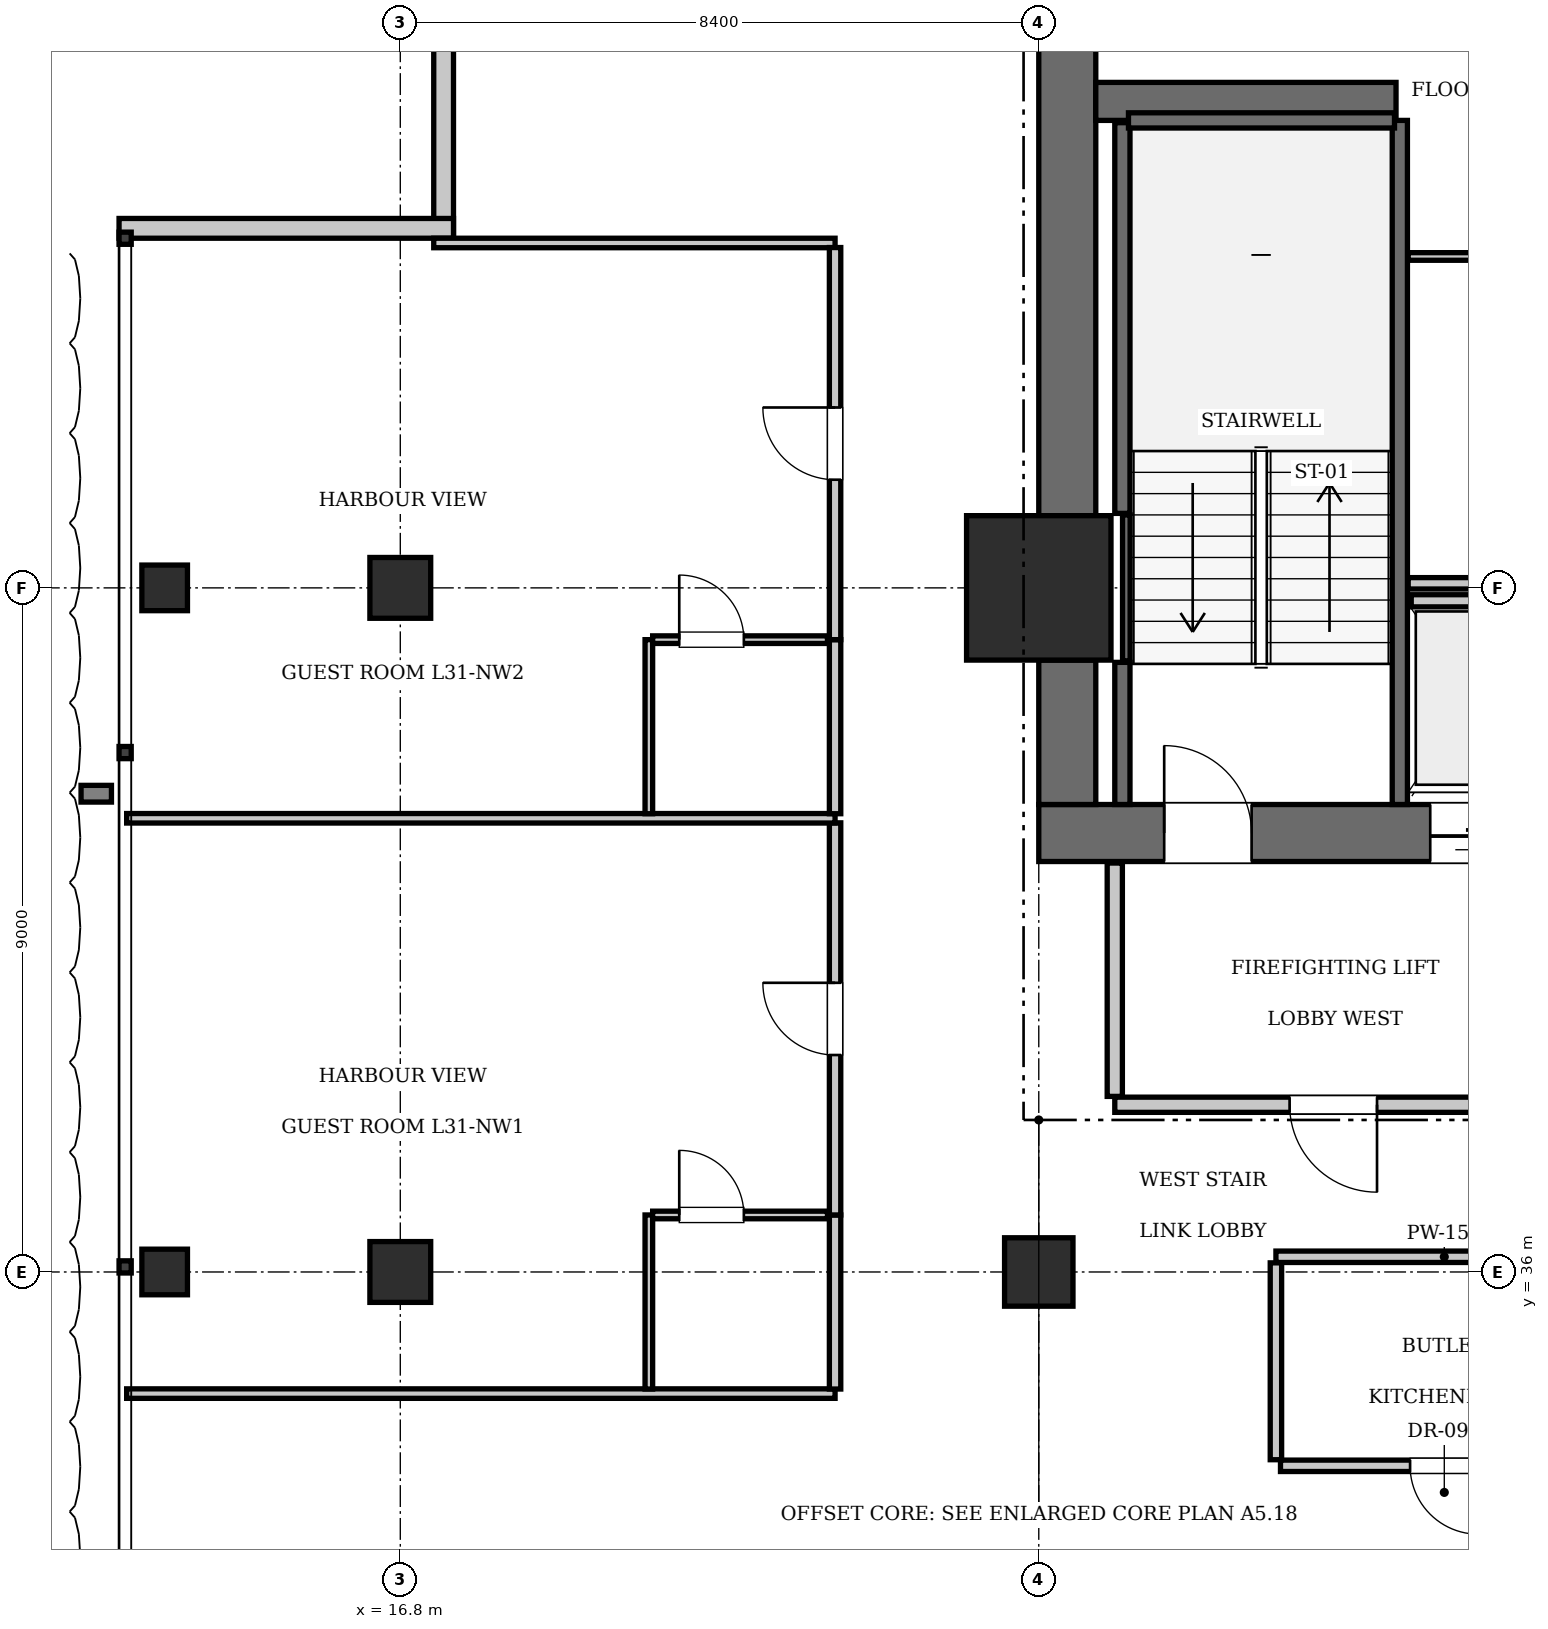
"""IFC4 building model, lengths in metres.
Left out: names, types, materials, properties, quantities, classifications, styles, units other than length and angle.
Written with IfcOpenShell. Run it as: python <this file> out.ifc"""

import sys

from ifc_helpers import new_model, si_unit, direction, frame, frame_2d, origin, origin_2d, place, context, subcontext, project, spatial, rectangle, i_section, extrude, element, fill, save


model = new_model("IFC4")
c1 = context("Model", 3, precision=1e-05, world=origin(), true_north=direction((0.0, 1.0)))
c2 = subcontext(c1, "Body", "Model", "MODEL_VIEW")
j1 = project(units=[si_unit("LENGTHUNIT", "METRE"), si_unit("PLANEANGLEUNIT", "RADIAN")], contexts=[c1])
p1 = place(None, origin())
s1 = spatial("IfcSite", under=j1, at=p1, CompositionType="ELEMENT")
p2 = place(p1, origin())
s2 = spatial("IfcBuilding", under=s1, at=p2, CompositionType="ELEMENT")
p3 = place(p2, frame((0.0, 0.0, 131.25)))
s3 = spatial("IfcBuildingStorey", under=s2, at=p3, CompositionType="ELEMENT", Elevation=131.25)
p4 = place(p3, frame((25.2, 45.0, 0.0), z_axis=(0.0, 0.0, 1.0), x_axis=(1.0, 0.0, 0.0)))
e1 = element("IfcColumn", 1, at=p4, inside=s3, PredefinedType="COLUMN", context=c2, shape_type="SweptSolid", body=[
    extrude(rectangle(XDim=1.9, YDim=1.9, at=origin_2d()), origin(), (0.0, 0.0, 1.0), 3.85),
])
p5 = place(p3, frame((25.2, 41.775, 0.0), z_axis=(0.0, 0.0, 1.0), x_axis=(1.0, 0.0, 0.0)))
e2 = element("IfcWall", 2, at=p5, inside=s3, PredefinedType="SHEAR", context=c2, shape_type="SweptSolid", body=[
    extrude(rectangle(XDim=6.8, YDim=0.75, at=frame_2d((3.4, 0.0))), origin(), (0.0, 0.0, 1.0), 3.85),
])
p6 = place(p5, frame((1.65, 0.0, 0.0)))
e3 = element("IfcOpeningElement", 3, at=p6, cuts=e2, PredefinedType="OPENING", context=c2, shape_type="SweptSolid", body=[
    extrude(rectangle(XDim=1.15, YDim=2.15, at=frame_2d((0.575, 1.075))), frame((0.0, 0.385, 0.0), z_axis=(0.0, -1.0, 0.0), x_axis=(1.0, 0.0, 0.0)), (0.0, 0.0, 1.0), 0.77),
])
p7 = place(p5, frame((5.15, 0.0, 0.0)))
e4 = element("IfcOpeningElement", 4, at=p7, cuts=e2, PredefinedType="OPENING", context=c2, shape_type="SweptSolid", body=[
    extrude(rectangle(XDim=1.1, YDim=2.2, at=frame_2d((0.55, 1.1))), frame((0.0, 0.385, 0.0), z_axis=(0.0, -1.0, 0.0), x_axis=(1.0, 0.0, 0.0)), (0.0, 0.0, 1.0), 0.77),
])
p8 = place(p3, frame((25.575, 42.15, 0.0), z_axis=(0.0, 0.0, 1.0), x_axis=(0.0, 1.0, 0.0)))
e5 = element("IfcWall", 5, at=p8, inside=s3, PredefinedType="SHEAR", context=c2, shape_type="SweptSolid", body=[
    extrude(rectangle(XDim=1.9, YDim=0.75, at=frame_2d((0.95, 0.0))), origin(), (0.0, 0.0, 1.0), 3.85),
])
p9 = place(p3, frame((25.575, 45.95, 0.0), z_axis=(0.0, 0.0, 1.0), x_axis=(0.0, 1.0, 0.0)))
e6 = element("IfcWall", 6, at=p9, inside=s3, PredefinedType="SHEAR", context=c2, shape_type="SweptSolid", body=[
    extrude(rectangle(XDim=7.3, YDim=0.75, at=frame_2d((3.65, 0.0))), origin(), (0.0, 0.0, 1.0), 3.85),
])
p10 = place(p3, frame((25.95, 51.4, 0.0), z_axis=(0.0, 0.0, 1.0), x_axis=(1.0, 0.0, 0.0)))
e7 = element("IfcWall", 7, at=p10, inside=s3, PredefinedType="SHEAR", context=c2, shape_type="SweptSolid", body=[
    extrude(rectangle(XDim=3.95, YDim=0.5, at=frame_2d((1.975, 0.0))), origin(), (0.0, 0.0, 1.0), 3.85),
])
p11 = place(p3, frame((25.2, 36.0, 0.0), z_axis=(0.0, 0.0, 1.0), x_axis=(1.0, 0.0, 0.0)))
e8 = element("IfcColumn", 8, at=p11, inside=s3, PredefinedType="COLUMN", context=c2, shape_type="SweptSolid", body=[
    extrude(rectangle(XDim=0.9, YDim=0.9, at=origin_2d()), origin(), (0.0, 0.0, 1.0), 3.85),
])
for number, where, z_axis, x_axis in (
    (9, (16.8, 36.0, 0.0), (0.0, 0.0, 1.0), (1.0, 0.0, 0.0)),
    (10, (16.8, 45.0, 0.0), (0.0, 0.0, 1.0), (1.0, 0.0, 0.0)),
):
    element("IfcColumn", number, at=place(p3, frame(where, z_axis=z_axis, x_axis=x_axis)), inside=s3, PredefinedType="COLUMN", context=c2, shape_type="SweptSolid", body=[
        extrude(rectangle(XDim=0.8, YDim=0.8, at=origin_2d()), origin(), (0.0, 0.0, 1.0), 3.85),
    ])
for number, where, z_axis, x_axis in (
    (11, (13.7, 36.0, 0.0), (0.0, 0.0, 1.0), (1.0, 0.0, 0.0)),
    (12, (13.7, 45.0, 0.0), (0.0, 0.0, 1.0), (1.0, 0.0, 0.0)),
):
    element("IfcColumn", number, at=place(p3, frame(where, z_axis=z_axis, x_axis=x_axis)), inside=s3, PredefinedType="COLUMN", context=c2, shape_type="SweptSolid", body=[
        extrude(i_section(OverallWidth=0.6, OverallDepth=0.6, WebThickness=0.025, FlangeThickness=0.038, at=origin_2d()), origin(), (0.0, 0.0, 1.0), 3.85),
    ])
p12 = place(p3, frame((29.95, 42.15, 0.0), z_axis=(0.0, 0.0, 1.0), x_axis=(0.0, 1.0, 0.0)))
e13 = element("IfcWall", 13, at=p12, inside=s3, PredefinedType="SOLIDWALL", context=c2, shape_type="SweptSolid", body=[
    extrude(rectangle(XDim=9.0, YDim=0.2, at=frame_2d((4.5, 0.0))), origin(), (0.0, 0.0, 1.0), 3.61),
])
p13 = place(p3, frame((26.3, 42.15, 0.0), z_axis=(0.0, 0.0, 1.0), x_axis=(0.0, 1.0, 0.0)))
e14 = element("IfcWall", 14, at=p13, inside=s3, PredefinedType="SOLIDWALL", context=c2, shape_type="SweptSolid", body=[
    extrude(rectangle(XDim=1.87, YDim=0.2, at=frame_2d((0.935, 0.0))), origin(), (0.0, 0.0, 1.0), 3.61),
])
p14 = place(p3, frame((26.3, 45.98, 0.0), z_axis=(0.0, 0.0, 1.0), x_axis=(0.0, 1.0, 0.0)))
e15 = element("IfcWall", 15, at=p14, inside=s3, PredefinedType="SOLIDWALL", context=c2, shape_type="SweptSolid", body=[
    extrude(rectangle(XDim=5.14, YDim=0.2, at=frame_2d((2.57, 0.0))), origin(), (0.0, 0.0, 1.0), 3.61),
])
p15 = place(p3, frame((26.38, 51.15, 0.0), z_axis=(0.0, 0.0, 1.0), x_axis=(1.0, 0.0, 0.0)))
e16 = element("IfcWall", 16, at=p15, inside=s3, PredefinedType="SOLIDWALL", context=c2, shape_type="SweptSolid", body=[
    extrude(rectangle(XDim=3.5, YDim=0.2, at=frame_2d((1.75, 0.0))), origin(), (0.0, 0.0, 1.0), 3.61),
])
p16 = place(p3, frame((26.352, 44.04, 0.0), z_axis=(0.0, 0.0, 1.0), x_axis=(0.0, 1.0, 0.0)))
e17 = element("IfcWall", 17, at=p16, inside=s3, PredefinedType="SOLIDWALL", context=c2, shape_type="SweptSolid", body=[
    extrude(rectangle(XDim=1.92, YDim=0.1, at=frame_2d((0.96, 0.0))), origin(), (0.0, 0.0, 1.0), 3.61),
])
p17 = place(p3, frame((30.1, 44.83, 0.0), z_axis=(0.0, 0.0, 1.0), x_axis=(1.0, 0.0, 0.0)))
e18 = element("IfcWall", 18, at=p17, inside=s3, PredefinedType="SOLIDWALL", context=c2, shape_type="SweptSolid", body=[
    extrude(rectangle(XDim=1.6, YDim=0.16, at=frame_2d((0.8, 0.0))), origin(), (0.0, 0.0, 1.0), 3.61),
])
for number, where, z_axis, x_axis in (
    (19, (17.37, 49.6, 0.0), (0.0, 0.0, 1.0), (0.0, 1.0, 0.0)),
    (20, (13.1, 49.73, 0.0), (0.0, 0.0, 1.0), (1.0, 0.0, 0.0)),
):
    element("IfcWall", number, at=place(p3, frame(where, z_axis=z_axis, x_axis=x_axis)), inside=s3, PredefinedType="SOLIDWALL", context=c2, shape_type="SweptSolid", body=[
        extrude(rectangle(XDim=4.4, YDim=0.26, at=frame_2d((2.2, 0.0))), origin(), (0.0, 0.0, 1.0), 3.61),
    ])
p18 = place(p3, frame((26.2, 38.2, 0.0), z_axis=(0.0, 0.0, 1.0), x_axis=(1.0, 0.0, 0.0)))
e21 = element("IfcWall", 21, at=p18, inside=s3, PredefinedType="PARTITIONING", context=c2, shape_type="SweptSolid", body=[
    extrude(rectangle(XDim=5.8, YDim=0.2, at=frame_2d((2.9, 0.0))), origin(), (0.0, 0.0, 1.0), 3.61),
])
p19 = place(p18, frame((2.3, 0.0, 0.0)))
e22 = element("IfcOpeningElement", 22, at=p19, cuts=e21, PredefinedType="OPENING", context=c2, shape_type="SweptSolid", body=[
    extrude(rectangle(XDim=1.15, YDim=2.15, at=frame_2d((0.575, 1.075))), frame((0.0, 0.11, 0.0), z_axis=(0.0, -1.0, 0.0), x_axis=(1.0, 0.0, 0.0)), (0.0, 0.0, 1.0), 0.22),
])
p20 = place(p3, frame((26.2, 38.31, 0.0), z_axis=(0.0, 0.0, 1.0), x_axis=(0.0, 1.0, 0.0)))
e23 = element("IfcWall", 23, at=p20, inside=s3, PredefinedType="PARTITIONING", context=c2, shape_type="SweptSolid", body=[
    extrude(rectangle(XDim=3.07, YDim=0.2, at=frame_2d((1.535, 0.0))), origin(), (0.0, 0.0, 1.0), 3.61),
])
p21 = place(p3, frame((30.06, 45.06, 0.0), z_axis=(0.0, 0.0, 1.0), x_axis=(1.0, 0.0, 0.0)))
e24 = element("IfcWall", 24, at=p21, inside=s3, PredefinedType="PARTITIONING", context=c2, shape_type="SweptSolid", body=[
    extrude(rectangle(XDim=3.18, YDim=0.15, at=frame_2d((1.59, 0.0))), origin(), (0.0, 0.0, 1.0), 3.61),
])
p22 = place(p3, frame((30.06, 49.36, 0.0), z_axis=(0.0, 0.0, 1.0), x_axis=(1.0, 0.0, 0.0)))
e25 = element("IfcWall", 25, at=p22, inside=s3, PredefinedType="PARTITIONING", context=c2, shape_type="SweptSolid", body=[
    extrude(rectangle(XDim=3.18, YDim=0.1, at=frame_2d((1.59, 0.0))), origin(), (0.0, 0.0, 1.0), 3.61),
])
p23 = place(p22, frame((1.95, 0.0, 0.0)))
e26 = element("IfcOpeningElement", 26, at=p23, cuts=e25, PredefinedType="OPENING", context=c2, shape_type="SweptSolid", body=[
    extrude(rectangle(XDim=0.8, YDim=2.05, at=frame_2d((0.4, 1.025))), frame((0.0, 0.06, 0.0), z_axis=(0.0, -1.0, 0.0), x_axis=(1.0, 0.0, 0.0)), (0.0, 0.0, 1.0), 0.12),
])
p24 = place(p3, frame((28.32, 36.2, 0.0), z_axis=(0.0, 0.0, 1.0), x_axis=(1.0, 0.0, 0.0)))
e27 = element("IfcWall", 27, at=p24, inside=s3, PredefinedType="PARTITIONING", context=c2, shape_type="SweptSolid", body=[
    extrude(rectangle(XDim=4.43, YDim=0.15, at=frame_2d((2.215, 0.0))), origin(), (0.0, 0.0, 1.0), 3.61),
])
p25 = place(p3, frame((28.32, 33.53, 0.0), z_axis=(0.0, 0.0, 1.0), x_axis=(0.0, 1.0, 0.0)))
e28 = element("IfcWall", 28, at=p25, inside=s3, PredefinedType="PARTITIONING", context=c2, shape_type="SweptSolid", body=[
    extrude(rectangle(XDim=2.59, YDim=0.15, at=frame_2d((1.295, 0.0))), origin(), (0.0, 0.0, 1.0), 3.61),
])
p26 = place(p3, frame((28.38, 33.45, 0.0), z_axis=(0.0, 0.0, 1.0), x_axis=(1.0, 0.0, 0.0)))
e29 = element("IfcWall", 29, at=p26, inside=s3, PredefinedType="PARTITIONING", context=c2, shape_type="SweptSolid", body=[
    extrude(rectangle(XDim=4.31, YDim=0.15, at=frame_2d((2.155, 0.0))), origin(), (0.0, 0.0, 1.0), 3.61),
])
p27 = place(p26, frame((1.705, 0.0, 0.0)))
e30 = element("IfcOpeningElement", 30, at=p27, cuts=e29, PredefinedType="OPENING", context=c2, shape_type="SweptSolid", body=[
    extrude(rectangle(XDim=0.9, YDim=2.1, at=frame_2d((0.45, 1.05))), frame((0.0, 0.085, 0.0), z_axis=(0.0, -1.0, 0.0), x_axis=(1.0, 0.0, 0.0)), (0.0, 0.0, 1.0), 0.17),
])
p28 = place(p3, frame((13.2, 34.4, 0.0), z_axis=(0.0, 0.0, 1.0), x_axis=(1.0, 0.0, 0.0)))
e31 = element("IfcWall", 31, at=p28, inside=s3, PredefinedType="PARTITIONING", context=c2, shape_type="SweptSolid", body=[
    extrude(rectangle(XDim=9.32, YDim=0.125, at=frame_2d((4.66, 0.0))), origin(), (0.0, 0.0, 1.0), 3.61),
])
p29 = place(p3, frame((17.24, 49.538, 0.0), z_axis=(0.0, 0.0, 1.0), x_axis=(1.0, 0.0, 0.0)))
e32 = element("IfcWall", 32, at=p29, inside=s3, PredefinedType="PARTITIONING", context=c2, shape_type="SweptSolid", body=[
    extrude(rectangle(XDim=5.28, YDim=0.125, at=frame_2d((2.64, 0.0))), origin(), (0.0, 0.0, 1.0), 3.61),
])
p30 = place(p3, frame((22.52, 34.46, 0.0), z_axis=(0.0, 0.0, 1.0), x_axis=(0.0, 1.0, 0.0)))
e33 = element("IfcWall", 33, at=p30, inside=s3, PredefinedType="PARTITIONING", context=c2, shape_type="SweptSolid", body=[
    extrude(rectangle(XDim=2.29, YDim=0.15, at=frame_2d((1.145, 0.0))), origin(), (0.0, 0.0, 1.0), 3.61),
])
p31 = place(p3, frame((22.52, 36.75, 0.0), z_axis=(0.0, 0.0, 1.0), x_axis=(0.0, 1.0, 0.0)))
e34 = element("IfcWall", 34, at=p31, inside=s3, PredefinedType="PARTITIONING", context=c2, shape_type="SweptSolid", body=[
    extrude(rectangle(XDim=5.159, YDim=0.15, at=frame_2d((2.579, 0.0))), origin(), (0.0, 0.0, 1.0), 3.61),
])
p32 = place(p31, frame((2.104, 0.0, 0.0)))
e35 = element("IfcOpeningElement", 35, at=p32, cuts=e34, PredefinedType="OPENING", context=c2, shape_type="SweptSolid", body=[
    extrude(rectangle(XDim=0.95, YDim=2.15, at=frame_2d((0.475, 1.075))), frame((0.0, 0.085, 0.0), z_axis=(0.0, -1.0, 0.0), x_axis=(1.0, 0.0, 0.0)), (0.0, 0.0, 1.0), 0.17),
])
p33 = place(p3, frame((20.07, 34.46, 0.0), z_axis=(0.0, 0.0, 1.0), x_axis=(0.0, 1.0, 0.0)))
e36 = element("IfcWall", 36, at=p33, inside=s3, PredefinedType="PARTITIONING", context=c2, shape_type="SweptSolid", body=[
    extrude(rectangle(XDim=2.29, YDim=0.1, at=frame_2d((1.145, 0.0))), origin(), (0.0, 0.0, 1.0), 3.61),
])
p34 = place(p3, frame((20.12, 36.75, 0.0), z_axis=(0.0, 0.0, 1.0), x_axis=(1.0, 0.0, 0.0)))
e37 = element("IfcWall", 37, at=p34, inside=s3, PredefinedType="PARTITIONING", context=c2, shape_type="SweptSolid", body=[
    extrude(rectangle(XDim=2.3, YDim=0.1, at=frame_2d((1.15, 0.0))), origin(), (0.0, 0.0, 1.0), 3.61),
])
p35 = place(p34, frame((0.35, 0.0, 0.0)))
e38 = element("IfcOpeningElement", 38, at=p35, cuts=e37, PredefinedType="OPENING", context=c2, shape_type="SweptSolid", body=[
    extrude(rectangle(XDim=0.85, YDim=2.1, at=frame_2d((0.425, 1.05))), frame((0.0, 0.06, 0.0), z_axis=(0.0, -1.0, 0.0), x_axis=(1.0, 0.0, 0.0)), (0.0, 0.0, 1.0), 0.12),
])
p36 = place(p3, frame((13.2, 41.969, 0.0), z_axis=(0.0, 0.0, 1.0), x_axis=(1.0, 0.0, 0.0)))
e39 = element("IfcWall", 39, at=p36, inside=s3, PredefinedType="PARTITIONING", context=c2, shape_type="SweptSolid", body=[
    extrude(rectangle(XDim=9.32, YDim=0.125, at=frame_2d((4.66, 0.0))), origin(), (0.0, 0.0, 1.0), 3.61),
])
p37 = place(p3, frame((22.52, 42.029, 0.0), z_axis=(0.0, 0.0, 1.0), x_axis=(0.0, 1.0, 0.0)))
e40 = element("IfcWall", 40, at=p37, inside=s3, PredefinedType="PARTITIONING", context=c2, shape_type="SweptSolid", body=[
    extrude(rectangle(XDim=2.29, YDim=0.15, at=frame_2d((1.145, 0.0))), origin(), (0.0, 0.0, 1.0), 3.61),
])
p38 = place(p3, frame((22.52, 44.319, 0.0), z_axis=(0.0, 0.0, 1.0), x_axis=(0.0, 1.0, 0.0)))
e41 = element("IfcWall", 41, at=p38, inside=s3, PredefinedType="PARTITIONING", context=c2, shape_type="SweptSolid", body=[
    extrude(rectangle(XDim=5.159, YDim=0.15, at=frame_2d((2.579, 0.0))), origin(), (0.0, 0.0, 1.0), 3.61),
])
p39 = place(p38, frame((2.104, 0.0, 0.0)))
e42 = element("IfcOpeningElement", 42, at=p39, cuts=e41, PredefinedType="OPENING", context=c2, shape_type="SweptSolid", body=[
    extrude(rectangle(XDim=0.95, YDim=2.15, at=frame_2d((0.475, 1.075))), frame((0.0, 0.085, 0.0), z_axis=(0.0, -1.0, 0.0), x_axis=(1.0, 0.0, 0.0)), (0.0, 0.0, 1.0), 0.17),
])
p40 = place(p3, frame((20.07, 42.029, 0.0), z_axis=(0.0, 0.0, 1.0), x_axis=(0.0, 1.0, 0.0)))
e43 = element("IfcWall", 43, at=p40, inside=s3, PredefinedType="PARTITIONING", context=c2, shape_type="SweptSolid", body=[
    extrude(rectangle(XDim=2.29, YDim=0.1, at=frame_2d((1.145, 0.0))), origin(), (0.0, 0.0, 1.0), 3.61),
])
p41 = place(p3, frame((20.12, 44.319, 0.0), z_axis=(0.0, 0.0, 1.0), x_axis=(1.0, 0.0, 0.0)))
e44 = element("IfcWall", 44, at=p41, inside=s3, PredefinedType="PARTITIONING", context=c2, shape_type="SweptSolid", body=[
    extrude(rectangle(XDim=2.3, YDim=0.1, at=frame_2d((1.15, 0.0))), origin(), (0.0, 0.0, 1.0), 3.61),
])
p42 = place(p41, frame((0.35, 0.0, 0.0)))
e45 = element("IfcOpeningElement", 45, at=p42, cuts=e44, PredefinedType="OPENING", context=c2, shape_type="SweptSolid", body=[
    extrude(rectangle(XDim=0.85, YDim=2.1, at=frame_2d((0.425, 1.05))), frame((0.0, 0.06, 0.0), z_axis=(0.0, -1.0, 0.0), x_axis=(1.0, 0.0, 0.0)), (0.0, 0.0, 1.0), 0.12),
])
p43 = place(p6, origin())
e46 = element("IfcDoor", 46, at=p43, inside=s3, OperationType="SINGLE_SWING_LEFT", PredefinedType="DOOR", context=c2, shape_type="SweptSolid", body=[
    extrude(rectangle(XDim=1.15, YDim=2.15, at=frame_2d((0.575, 1.075))), frame((0.0, 0.025, 0.0), z_axis=(0.0, -1.0, 0.0), x_axis=(1.0, 0.0, 0.0)), (0.0, 0.0, 1.0), 0.05),
])
fill(e3, e46)
p44 = place(p7, frame((1.1, 0.0, 0.0), z_axis=(0.0, 0.0, 1.0), x_axis=(-1.0, 0.0, 0.0)))
e47 = element("IfcDoor", 47, at=p44, inside=s3, OperationType="SLIDING_TO_LEFT", PredefinedType="DOOR", context=c2, shape_type="SweptSolid", body=[
    extrude(rectangle(XDim=1.1, YDim=2.2, at=frame_2d((0.55, 1.1))), frame((0.0, 0.025, 0.0), z_axis=(0.0, -1.0, 0.0), x_axis=(1.0, 0.0, 0.0)), (0.0, 0.0, 1.0), 0.05),
])
fill(e4, e47)
p45 = place(p19, frame((1.15, 0.0, 0.0), z_axis=(0.0, 0.0, 1.0), x_axis=(-1.0, 0.0, 0.0)))
e48 = element("IfcDoor", 48, at=p45, inside=s3, OperationType="SINGLE_SWING_LEFT", PredefinedType="DOOR", context=c2, shape_type="SweptSolid", body=[
    extrude(rectangle(XDim=1.15, YDim=2.15, at=frame_2d((0.575, 1.075))), frame((0.0, 0.025, 0.0), z_axis=(0.0, -1.0, 0.0), x_axis=(1.0, 0.0, 0.0)), (0.0, 0.0, 1.0), 0.05),
])
fill(e22, e48)
p46 = place(p27, frame((0.9, 0.0, 0.0), z_axis=(0.0, 0.0, 1.0), x_axis=(-1.0, 0.0, 0.0)))
e49 = element("IfcDoor", 49, at=p46, inside=s3, OperationType="SINGLE_SWING_LEFT", PredefinedType="DOOR", context=c2, shape_type="SweptSolid", body=[
    extrude(rectangle(XDim=0.9, YDim=2.1, at=frame_2d((0.45, 1.05))), frame((0.0, 0.025, 0.0), z_axis=(0.0, -1.0, 0.0), x_axis=(1.0, 0.0, 0.0)), (0.0, 0.0, 1.0), 0.05),
])
fill(e30, e49)
p47 = place(p35, origin())
e50 = element("IfcDoor", 50, at=p47, inside=s3, OperationType="SINGLE_SWING_LEFT", PredefinedType="DOOR", context=c2, shape_type="SweptSolid", body=[
    extrude(rectangle(XDim=0.85, YDim=2.1, at=frame_2d((0.425, 1.05))), frame((0.0, 0.025, 0.0), z_axis=(0.0, -1.0, 0.0), x_axis=(1.0, 0.0, 0.0)), (0.0, 0.0, 1.0), 0.05),
])
fill(e38, e50)
p48 = place(p32, origin())
e51 = element("IfcDoor", 51, at=p48, inside=s3, OperationType="SINGLE_SWING_RIGHT", PredefinedType="DOOR", context=c2, shape_type="SweptSolid", body=[
    extrude(rectangle(XDim=0.95, YDim=2.15, at=frame_2d((0.475, 1.075))), frame((0.0, 0.025, 0.0), z_axis=(0.0, -1.0, 0.0), x_axis=(1.0, 0.0, 0.0)), (0.0, 0.0, 1.0), 0.05),
])
fill(e35, e51)
p49 = place(p42, origin())
e52 = element("IfcDoor", 52, at=p49, inside=s3, OperationType="SINGLE_SWING_LEFT", PredefinedType="DOOR", context=c2, shape_type="SweptSolid", body=[
    extrude(rectangle(XDim=0.85, YDim=2.1, at=frame_2d((0.425, 1.05))), frame((0.0, 0.025, 0.0), z_axis=(0.0, -1.0, 0.0), x_axis=(1.0, 0.0, 0.0)), (0.0, 0.0, 1.0), 0.05),
])
fill(e45, e52)
p50 = place(p39, origin())
e53 = element("IfcDoor", 53, at=p50, inside=s3, OperationType="SINGLE_SWING_RIGHT", PredefinedType="DOOR", context=c2, shape_type="SweptSolid", body=[
    extrude(rectangle(XDim=0.95, YDim=2.15, at=frame_2d((0.475, 1.075))), frame((0.0, 0.025, 0.0), z_axis=(0.0, -1.0, 0.0), x_axis=(1.0, 0.0, 0.0)), (0.0, 0.0, 1.0), 0.05),
])
fill(e42, e53)
save(model, sys.argv[1])
